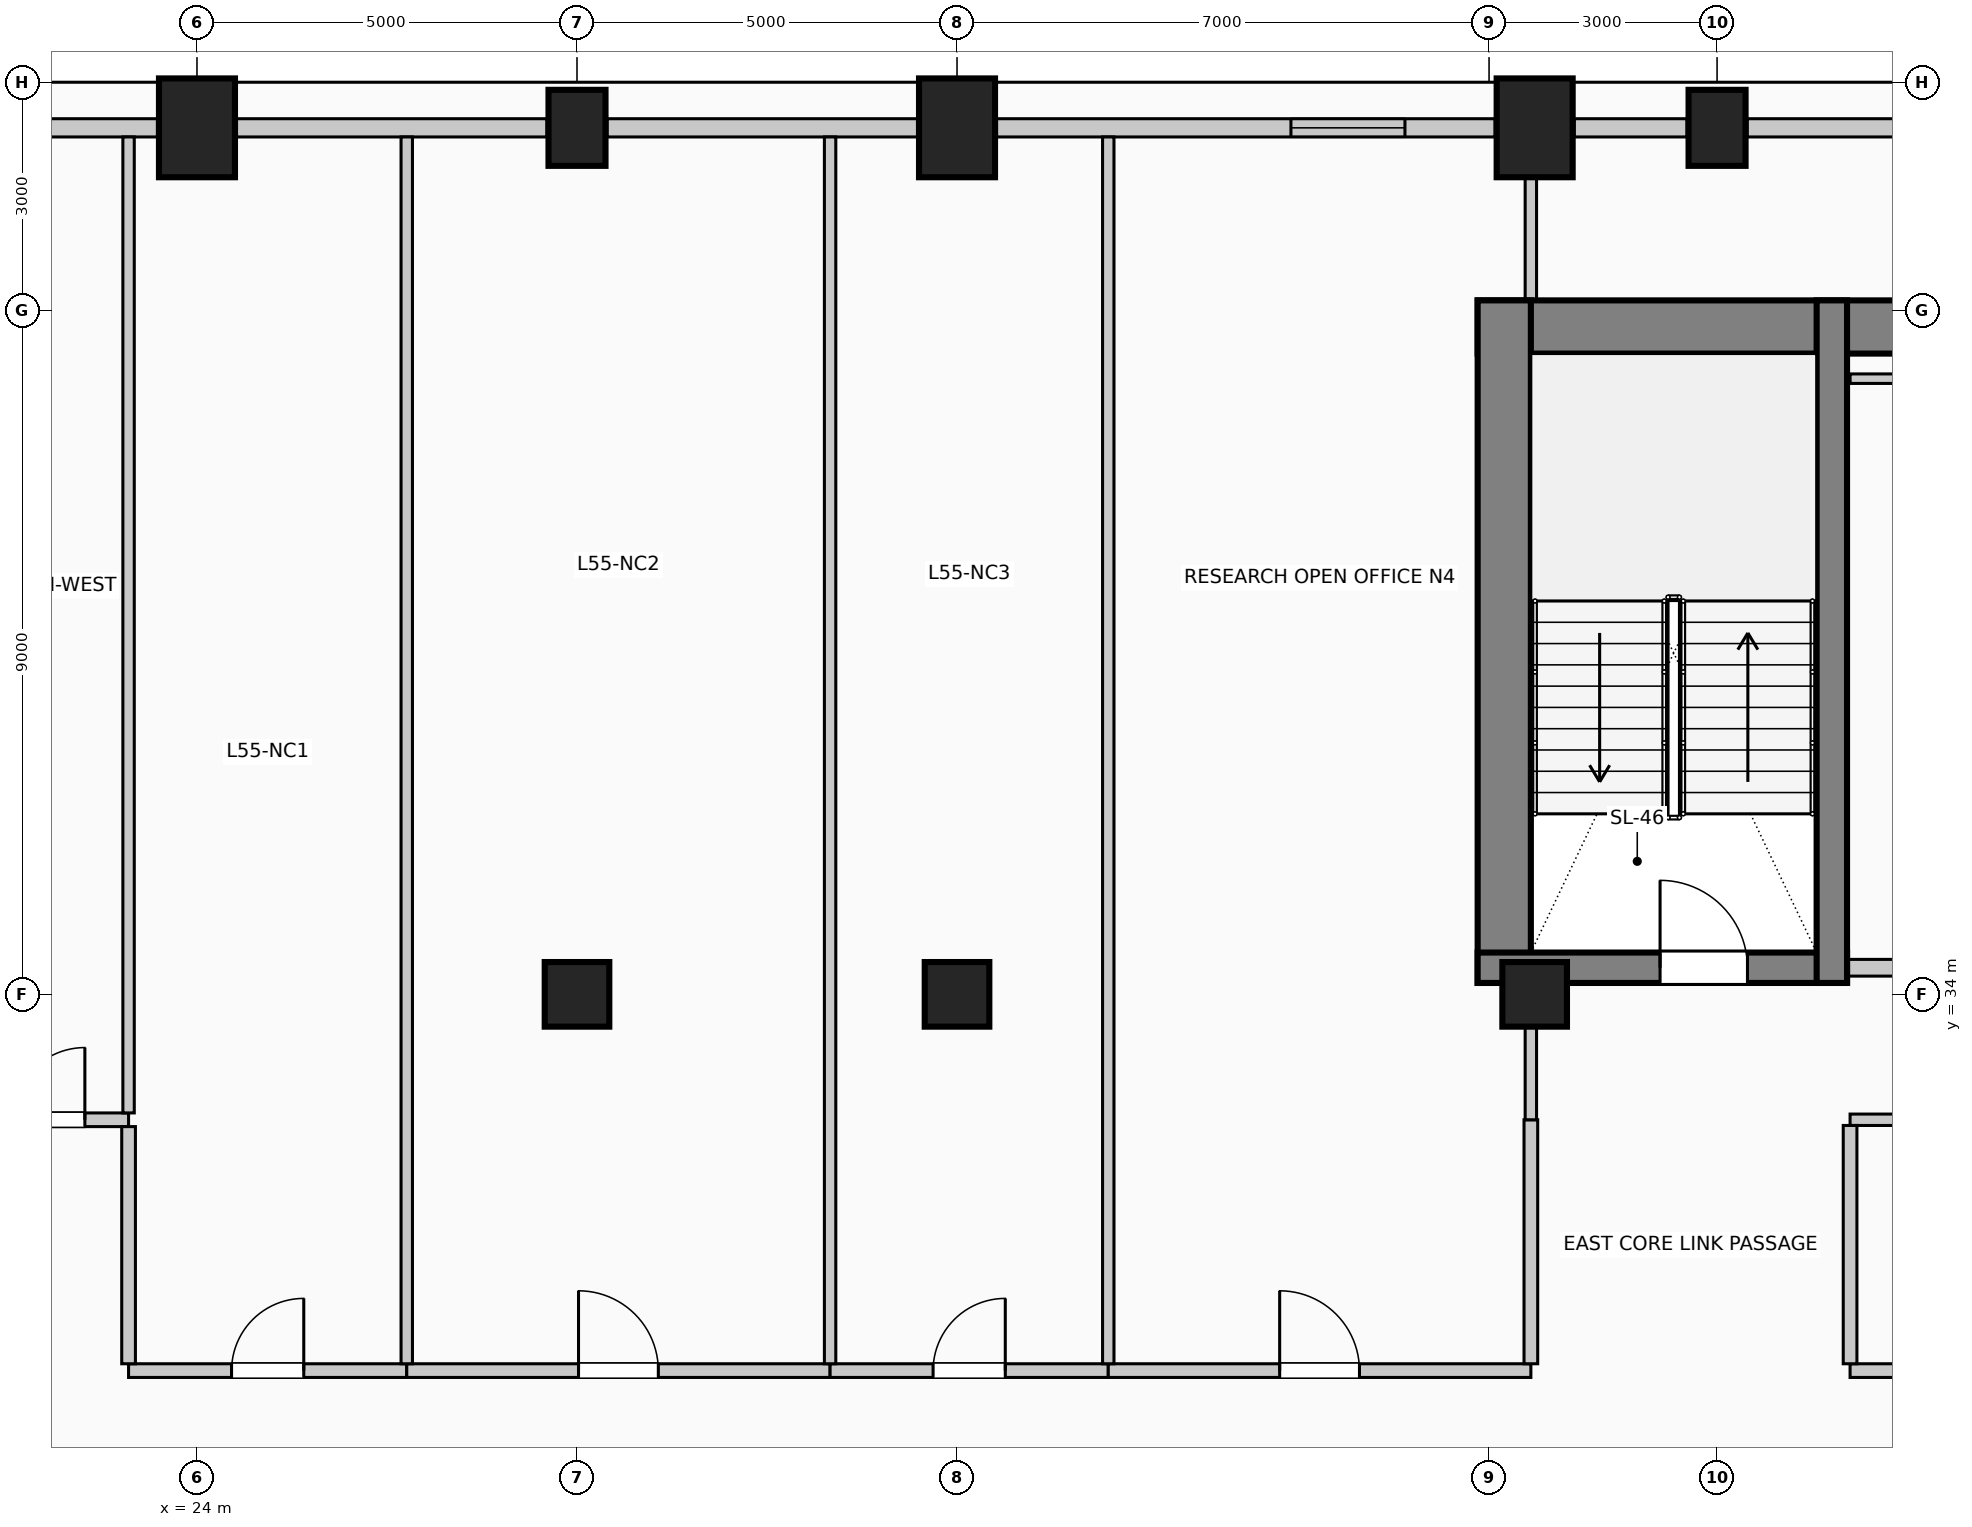
"""IFC4 building model, lengths in metres.
Left out: names, types, materials, properties, quantities, classifications, styles, units other than length and angle.
Written with IfcOpenShell. Run it as: python <this file> out.ifc"""

import sys

from ifc_helpers import new_model, si_unit, direction, frame, frame_2d, origin, origin_2d, place, context, subcontext, project, spatial, rectangle, circle, extrude, element, fill, save


model = new_model("IFC4")
c1 = context("Model", 3, precision=1e-05, world=origin(), true_north=direction((0.0, 1.0)))
c2 = subcontext(c1, "Body", "Model", "MODEL_VIEW")
j1 = project(units=[si_unit("LENGTHUNIT", "METRE"), si_unit("PLANEANGLEUNIT", "RADIAN")], contexts=[c1])
p1 = place(None, origin())
s1 = spatial("IfcSite", under=j1, at=p1, CompositionType="ELEMENT")
p2 = place(p1, origin())
s2 = spatial("IfcBuilding", under=s1, at=p2, CompositionType="ELEMENT")
p3 = place(p2, frame((0.0, 0.0, 226.6)))
s3 = spatial("IfcBuildingStorey", under=s2, at=p3, CompositionType="ELEMENT", Elevation=226.6)
p4 = place(p3, frame((40.85, 42.78, 0.0), z_axis=(0.0, 0.0, 1.0), x_axis=(1.0, 0.0, 0.0)))
e1 = element("IfcWall", 1, at=p4, inside=s3, PredefinedType="SHEAR", context=c2, shape_type="SweptSolid", body=[
    extrude(rectangle(XDim=14.3, YDim=0.7, at=frame_2d((7.15, 0.0))), origin(), (0.0, 0.0, 1.0), 4.0),
])
p5 = place(p3, frame((41.2, 34.15, 0.0), z_axis=(0.0, 0.0, 1.0), x_axis=(0.0, 1.0, 0.0)))
e2 = element("IfcWall", 2, at=p5, inside=s3, PredefinedType="SHEAR", context=c2, shape_type="SweptSolid", body=[
    extrude(rectangle(XDim=8.98, YDim=0.7, at=frame_2d((4.49, 0.0))), origin(), (0.0, 0.0, 1.0), 4.0),
])
p6 = place(p3, frame((40.85, 34.35, 0.0), z_axis=(0.0, 0.0, 1.0), x_axis=(1.0, 0.0, 0.0)))
e3 = element("IfcWall", 3, at=p6, inside=s3, PredefinedType="SHEAR", context=c2, shape_type="SweptSolid", body=[
    extrude(rectangle(XDim=4.86, YDim=0.4, at=frame_2d((2.43, 0.0))), origin(), (0.0, 0.0, 1.0), 4.0),
])
p7 = place(p6, frame((2.4, 0.0, 0.0)))
e4 = element("IfcOpeningElement", 4, at=p7, cuts=e3, PredefinedType="OPENING", context=c2, shape_type="SweptSolid", body=[
    extrude(rectangle(XDim=1.15, YDim=2.2, at=frame_2d((0.575, 1.1))), frame((0.0, 0.21, 0.0), z_axis=(0.0, -1.0, 0.0), x_axis=(1.0, 0.0, 0.0)), (0.0, 0.0, 1.0), 0.42),
])
p8 = place(p3, frame((45.51, 34.15, 0.0), z_axis=(0.0, 0.0, 1.0), x_axis=(0.0, 1.0, 0.0)))
e5 = element("IfcWall", 5, at=p8, inside=s3, PredefinedType="SHEAR", context=c2, shape_type="SweptSolid", body=[
    extrude(rectangle(XDim=8.98, YDim=0.4, at=frame_2d((4.49, 0.0))), origin(), (0.0, 0.0, 1.0), 4.0),
])
p9 = place(p3, frame((24.0, 45.4, 0.0), z_axis=(0.0, 0.0, 1.0), x_axis=(1.0, 0.0, 0.0)))
e6 = element("IfcColumn", 6, at=p9, inside=s3, PredefinedType="COLUMN", context=c2, shape_type="SweptSolid", body=[
    extrude(rectangle(XDim=1.0, YDim=1.3, at=origin_2d()), origin(), (0.0, 0.0, 1.0), 4.0),
])
p10 = place(p3, frame((29.0, 45.4, 0.0), z_axis=(0.0, 0.0, 1.0), x_axis=(1.0, 0.0, 0.0)))
e7 = element("IfcColumn", 7, at=p10, inside=s3, PredefinedType="COLUMN", context=c2, shape_type="SweptSolid", body=[
    extrude(rectangle(XDim=0.75, YDim=1.0, at=origin_2d()), origin(), (0.0, 0.0, 1.0), 4.0),
])
for number, where, z_axis, x_axis in (
    (8, (34.0, 45.4, 0.0), (0.0, 0.0, 1.0), (1.0, 0.0, 0.0)),
    (9, (41.6, 45.4, 0.0), (0.0, 0.0, 1.0), (1.0, 0.0, 0.0)),
):
    element("IfcColumn", number, at=place(p3, frame(where, z_axis=z_axis, x_axis=x_axis)), inside=s3, PredefinedType="COLUMN", context=c2, shape_type="SweptSolid", body=[
        extrude(rectangle(XDim=1.0, YDim=1.3, at=origin_2d()), origin(), (0.0, 0.0, 1.0), 4.0),
    ])
p11 = place(p3, frame((44.0, 45.4, 0.0), z_axis=(0.0, 0.0, 1.0), x_axis=(1.0, 0.0, 0.0)))
e10 = element("IfcColumn", 10, at=p11, inside=s3, PredefinedType="COLUMN", context=c2, shape_type="SweptSolid", body=[
    extrude(rectangle(XDim=0.75, YDim=1.0, at=origin_2d()), origin(), (0.0, 0.0, 1.0), 4.0),
])
for number, where, z_axis, x_axis in (
    (11, (29.0, 34.0, 0.0), (0.0, 0.0, 1.0), (1.0, 0.0, 0.0)),
    (12, (41.6, 34.0, 0.0), (0.0, 0.0, 1.0), (1.0, 0.0, 0.0)),
    (13, (34.0, 34.0, 0.0), (0.0, 0.0, 1.0), (1.0, 0.0, 0.0)),
):
    element("IfcColumn", number, at=place(p3, frame(where, z_axis=z_axis, x_axis=x_axis)), inside=s3, PredefinedType="COLUMN", context=c2, shape_type="SweptSolid", body=[
        extrude(circle(Radius=0.425, at=origin_2d()), origin(), (0.0, 0.0, 1.0), 4.0),
    ])
p12 = place(p3, frame((16.92, 45.4, 0.0), z_axis=(0.0, 0.0, 1.0), x_axis=(1.0, 0.0, 0.0)))
e14 = element("IfcWall", 14, at=p12, inside=s3, PredefinedType="SOLIDWALL", context=c2, shape_type="SweptSolid", body=[
    extrude(rectangle(XDim=6.56, YDim=0.24, at=frame_2d((3.28, 0.0))), origin(), (0.0, 0.0, 1.0), 3.0),
])
p13 = place(p12, frame((1.187, 0.0, 0.42)))
e15 = element("IfcOpeningElement", 15, at=p13, cuts=e14, PredefinedType="OPENING", context=c2, shape_type="SweptSolid", body=[
    extrude(rectangle(XDim=1.5, YDim=2.2, at=frame_2d((0.75, 1.1))), frame((0.0, 0.13, 0.0), z_axis=(0.0, -1.0, 0.0), x_axis=(1.0, 0.0, 0.0)), (0.0, 0.0, 1.0), 0.26),
])
for number, where, z_axis, x_axis in (
    (16, (24.52, 45.4, 0.0), (0.0, 0.0, 1.0), (1.0, 0.0, 0.0)),
    (17, (29.395, 45.4, 0.0), (0.0, 0.0, 1.0), (1.0, 0.0, 0.0)),
):
    element("IfcWall", number, at=place(p3, frame(where, z_axis=z_axis, x_axis=x_axis)), inside=s3, PredefinedType="SOLIDWALL", context=c2, shape_type="SweptSolid", body=[
        extrude(rectangle(XDim=4.085, YDim=0.24, at=frame_2d((2.042, 0.0))), origin(), (0.0, 0.0, 1.0), 3.0),
    ])
p14 = place(p3, frame((34.52, 45.4, 0.0), z_axis=(0.0, 0.0, 1.0), x_axis=(1.0, 0.0, 0.0)))
e18 = element("IfcWall", 18, at=p14, inside=s3, PredefinedType="SOLIDWALL", context=c2, shape_type="SweptSolid", body=[
    extrude(rectangle(XDim=6.56, YDim=0.24, at=frame_2d((3.28, 0.0))), origin(), (0.0, 0.0, 1.0), 3.0),
])
p15 = place(p14, frame((3.873, 0.0, 0.42)))
e19 = element("IfcOpeningElement", 19, at=p15, cuts=e18, PredefinedType="OPENING", context=c2, shape_type="SweptSolid", body=[
    extrude(rectangle(XDim=1.5, YDim=2.2, at=frame_2d((0.75, 1.1))), frame((0.0, 0.13, 0.0), z_axis=(0.0, -1.0, 0.0), x_axis=(1.0, 0.0, 0.0)), (0.0, 0.0, 1.0), 0.26),
])
p16 = place(p3, frame((42.12, 45.4, 0.0), z_axis=(0.0, 0.0, 1.0), x_axis=(1.0, 0.0, 0.0)))
e20 = element("IfcWall", 20, at=p16, inside=s3, PredefinedType="SOLIDWALL", context=c2, shape_type="SweptSolid", body=[
    extrude(rectangle(XDim=1.485, YDim=0.24, at=frame_2d((0.742, 0.0))), origin(), (0.0, 0.0, 1.0), 3.0),
])
p17 = place(p3, frame((44.395, 45.4, 0.0), z_axis=(0.0, 0.0, 1.0), x_axis=(1.0, 0.0, 0.0)))
e21 = element("IfcWall", 21, at=p17, inside=s3, PredefinedType="SOLIDWALL", context=c2, shape_type="SweptSolid", body=[
    extrude(rectangle(XDim=4.71, YDim=0.24, at=frame_2d((2.355, 0.0))), origin(), (0.0, 0.0, 1.0), 3.0),
])
p18 = place(p3, frame((45.72, 34.35, 0.0), z_axis=(0.0, 0.0, 1.0), x_axis=(1.0, 0.0, 0.0)))
e22 = element("IfcWall", 22, at=p18, inside=s3, PredefinedType="PARTITIONING", context=c2, shape_type="SweptSolid", body=[
    extrude(rectangle(XDim=4.56, YDim=0.22, at=frame_2d((2.28, 0.0))), origin(), (0.0, 0.0, 1.0), 3.75),
])
p19 = place(p18, frame((0.65, 0.0, 0.0)))
e23 = element("IfcOpeningElement", 23, at=p19, cuts=e22, PredefinedType="OPENING", context=c2, shape_type="SweptSolid", body=[
    extrude(rectangle(XDim=0.92, YDim=2.1, at=frame_2d((0.46, 1.05))), frame((0.0, 0.12, 0.0), z_axis=(0.0, -1.0, 0.0), x_axis=(1.0, 0.0, 0.0)), (0.0, 0.0, 1.0), 0.24),
])
p20 = place(p18, frame((2.95, 0.0, 0.0)))
e24 = element("IfcOpeningElement", 24, at=p20, cuts=e22, PredefinedType="OPENING", context=c2, shape_type="SweptSolid", body=[
    extrude(rectangle(XDim=0.88, YDim=2.1, at=frame_2d((0.44, 1.05))), frame((0.0, 0.12, 0.0), z_axis=(0.0, -1.0, 0.0), x_axis=(1.0, 0.0, 0.0)), (0.0, 0.0, 1.0), 0.24),
])
p21 = place(p3, frame((23.1, 29.05, 0.0), z_axis=(0.0, 0.0, 1.0), x_axis=(1.0, 0.0, 0.0)))
e25 = element("IfcWall", 25, at=p21, inside=s3, PredefinedType="PARTITIONING", context=c2, shape_type="SweptSolid", body=[
    extrude(rectangle(XDim=3.66, YDim=0.18, at=frame_2d((1.83, 0.0))), origin(), (0.0, 0.0, 1.0), 3.75),
])
p22 = place(p21, frame((1.355, 0.0, 0.0)))
e26 = element("IfcOpeningElement", 26, at=p22, cuts=e25, PredefinedType="OPENING", context=c2, shape_type="SweptSolid", body=[
    extrude(rectangle(XDim=0.95, YDim=2.15, at=frame_2d((0.475, 1.075))), frame((0.0, 0.1, 0.0), z_axis=(0.0, -1.0, 0.0), x_axis=(1.0, 0.0, 0.0)), (0.0, 0.0, 1.0), 0.2),
])
p23 = place(p3, frame((26.76, 29.05, 0.0), z_axis=(0.0, 0.0, 1.0), x_axis=(1.0, 0.0, 0.0)))
e27 = element("IfcWall", 27, at=p23, inside=s3, PredefinedType="PARTITIONING", context=c2, shape_type="SweptSolid", body=[
    extrude(rectangle(XDim=5.57, YDim=0.18, at=frame_2d((2.785, 0.0))), origin(), (0.0, 0.0, 1.0), 3.75),
])
p24 = place(p23, frame((2.26, 0.0, 0.0)))
e28 = element("IfcOpeningElement", 28, at=p24, cuts=e27, PredefinedType="OPENING", context=c2, shape_type="SweptSolid", body=[
    extrude(rectangle(XDim=1.05, YDim=2.15, at=frame_2d((0.525, 1.075))), frame((0.0, 0.1, 0.0), z_axis=(0.0, -1.0, 0.0), x_axis=(1.0, 0.0, 0.0)), (0.0, 0.0, 1.0), 0.2),
])
p25 = place(p3, frame((32.33, 29.05, 0.0), z_axis=(0.0, 0.0, 1.0), x_axis=(1.0, 0.0, 0.0)))
e29 = element("IfcWall", 29, at=p25, inside=s3, PredefinedType="PARTITIONING", context=c2, shape_type="SweptSolid", body=[
    extrude(rectangle(XDim=3.66, YDim=0.18, at=frame_2d((1.83, 0.0))), origin(), (0.0, 0.0, 1.0), 3.75),
])
p26 = place(p25, frame((1.355, 0.0, 0.0)))
e30 = element("IfcOpeningElement", 30, at=p26, cuts=e29, PredefinedType="OPENING", context=c2, shape_type="SweptSolid", body=[
    extrude(rectangle(XDim=0.95, YDim=2.15, at=frame_2d((0.475, 1.075))), frame((0.0, 0.1, 0.0), z_axis=(0.0, -1.0, 0.0), x_axis=(1.0, 0.0, 0.0)), (0.0, 0.0, 1.0), 0.2),
])
p27 = place(p3, frame((35.99, 29.05, 0.0), z_axis=(0.0, 0.0, 1.0), x_axis=(1.0, 0.0, 0.0)))
e31 = element("IfcWall", 31, at=p27, inside=s3, PredefinedType="PARTITIONING", context=c2, shape_type="SweptSolid", body=[
    extrude(rectangle(XDim=5.56, YDim=0.18, at=frame_2d((2.78, 0.0))), origin(), (0.0, 0.0, 1.0), 3.75),
])
p28 = place(p27, frame((2.255, 0.0, 0.0)))
e32 = element("IfcOpeningElement", 32, at=p28, cuts=e31, PredefinedType="OPENING", context=c2, shape_type="SweptSolid", body=[
    extrude(rectangle(XDim=1.05, YDim=2.15, at=frame_2d((0.525, 1.075))), frame((0.0, 0.1, 0.0), z_axis=(0.0, -1.0, 0.0), x_axis=(1.0, 0.0, 0.0)), (0.0, 0.0, 1.0), 0.2),
])
p29 = place(p3, frame((45.75, 29.05, 0.0), z_axis=(0.0, 0.0, 1.0), x_axis=(1.0, 0.0, 0.0)))
e33 = element("IfcWall", 33, at=p29, inside=s3, PredefinedType="PARTITIONING", context=c2, shape_type="SweptSolid", body=[
    extrude(rectangle(XDim=11.53, YDim=0.18, at=frame_2d((5.765, 0.0))), origin(), (0.0, 0.0, 1.0), 3.75),
])
p30 = place(p29, frame((5.29, 0.0, 0.0)))
e34 = element("IfcOpeningElement", 34, at=p30, cuts=e33, PredefinedType="OPENING", context=c2, shape_type="SweptSolid", body=[
    extrude(rectangle(XDim=0.95, YDim=2.15, at=frame_2d((0.475, 1.075))), frame((0.0, 0.1, 0.0), z_axis=(0.0, -1.0, 0.0), x_axis=(1.0, 0.0, 0.0)), (0.0, 0.0, 1.0), 0.2),
])
p31 = place(p3, frame((21.0, 32.35, 0.0), z_axis=(0.0, 0.0, 1.0), x_axis=(1.0, 0.0, 0.0)))
e35 = element("IfcWall", 35, at=p31, inside=s3, PredefinedType="PARTITIONING", context=c2, shape_type="SweptSolid", body=[
    extrude(rectangle(XDim=2.1, YDim=0.18, at=frame_2d((1.05, 0.0))), origin(), (0.0, 0.0, 1.0), 3.75),
])
p32 = place(p31, frame((0.575, 0.0, 0.0)))
e36 = element("IfcOpeningElement", 36, at=p32, cuts=e35, PredefinedType="OPENING", context=c2, shape_type="SweptSolid", body=[
    extrude(rectangle(XDim=0.95, YDim=2.15, at=frame_2d((0.475, 1.075))), frame((0.0, 0.1, 0.0), z_axis=(0.0, -1.0, 0.0), x_axis=(1.0, 0.0, 0.0)), (0.0, 0.0, 1.0), 0.2),
])
p33 = place(p3, frame((45.75, 32.35, 0.0), z_axis=(0.0, 0.0, 1.0), x_axis=(1.0, 0.0, 0.0)))
e37 = element("IfcWall", 37, at=p33, inside=s3, PredefinedType="PARTITIONING", context=c2, shape_type="SweptSolid", body=[
    extrude(rectangle(XDim=8.7, YDim=0.15, at=frame_2d((4.35, 0.0))), origin(), (0.0, 0.0, 1.0), 3.75),
])
p34 = place(p3, frame((45.75, 42.1, 0.0), z_axis=(0.0, 0.0, 1.0), x_axis=(1.0, 0.0, 0.0)))
e38 = element("IfcWall", 38, at=p34, inside=s3, PredefinedType="PARTITIONING", context=c2, shape_type="SweptSolid", body=[
    extrude(rectangle(XDim=2.25, YDim=0.125, at=frame_2d((1.125, 0.0))), origin(), (0.0, 0.0, 1.0), 3.75),
])
p35 = place(p3, frame((23.1, 29.14, 0.0), z_axis=(0.0, 0.0, 1.0), x_axis=(0.0, 1.0, 0.0)))
e39 = element("IfcWall", 39, at=p35, inside=s3, PredefinedType="PARTITIONING", context=c2, shape_type="SweptSolid", body=[
    extrude(rectangle(XDim=3.12, YDim=0.18, at=frame_2d((1.56, 0.0))), origin(), (0.0, 0.0, 1.0), 3.75),
])
p36 = place(p3, frame((23.1, 32.44, 0.0), z_axis=(0.0, 0.0, 1.0), x_axis=(0.0, 1.0, 0.0)))
e40 = element("IfcWall", 40, at=p36, inside=s3, PredefinedType="PARTITIONING", context=c2, shape_type="SweptSolid", body=[
    extrude(rectangle(XDim=12.84, YDim=0.15, at=frame_2d((6.42, 0.0))), origin(), (0.0, 0.0, 1.0), 3.75),
])
for number, where, z_axis, x_axis in (
    (41, (26.76, 29.14, 0.0), (0.0, 0.0, 1.0), (0.0, 1.0, 0.0)),
    (42, (32.33, 29.14, 0.0), (0.0, 0.0, 1.0), (0.0, 1.0, 0.0)),
    (43, (35.99, 29.14, 0.0), (0.0, 0.0, 1.0), (0.0, 1.0, 0.0)),
):
    element("IfcWall", number, at=place(p3, frame(where, z_axis=z_axis, x_axis=x_axis)), inside=s3, PredefinedType="PARTITIONING", context=c2, shape_type="SweptSolid", body=[
        extrude(rectangle(XDim=16.14, YDim=0.15, at=frame_2d((8.07, 0.0))), origin(), (0.0, 0.0, 1.0), 3.75),
    ])
p37 = place(p3, frame((41.55, 29.14, 0.0), z_axis=(0.0, 0.0, 1.0), x_axis=(0.0, 1.0, 0.0)))
e44 = element("IfcWall", 44, at=p37, inside=s3, PredefinedType="PARTITIONING", context=c2, shape_type="SweptSolid", body=[
    extrude(rectangle(XDim=3.21, YDim=0.18, at=frame_2d((1.605, 0.0))), origin(), (0.0, 0.0, 1.0), 3.145),
])
p38 = place(p3, frame((41.55, 32.35, 0.0), z_axis=(0.0, 0.0, 1.0), x_axis=(0.0, 1.0, 0.0)))
e45 = element("IfcWall", 45, at=p38, inside=s3, PredefinedType="PARTITIONING", context=c2, shape_type="SweptSolid", body=[
    extrude(rectangle(XDim=1.225, YDim=0.15, at=frame_2d((0.612, 0.0))), origin(), (0.0, 0.0, 1.0), 3.145),
])
p39 = place(p3, frame((41.55, 43.13, 0.0), z_axis=(0.0, 0.0, 1.0), x_axis=(0.0, 1.0, 0.0)))
e46 = element("IfcWall", 46, at=p39, inside=s3, PredefinedType="PARTITIONING", context=c2, shape_type="SweptSolid", body=[
    extrude(rectangle(XDim=1.62, YDim=0.15, at=frame_2d((0.81, 0.0))), origin(), (0.0, 0.0, 1.0), 3.75),
])
p40 = place(p3, frame((45.75, 29.14, 0.0), z_axis=(0.0, 0.0, 1.0), x_axis=(0.0, 1.0, 0.0)))
e47 = element("IfcWall", 47, at=p40, inside=s3, PredefinedType="PARTITIONING", context=c2, shape_type="SweptSolid", body=[
    extrude(rectangle(XDim=3.135, YDim=0.18, at=frame_2d((1.567, 0.0))), origin(), (0.0, 0.0, 1.0), 3.75),
])
p41 = place(p15, origin())
e48 = element("IfcWindow", 48, at=p41, inside=s3, PartitioningType="SINGLE_PANEL", PredefinedType="WINDOW", context=c2, shape_type="SweptSolid", body=[
    extrude(rectangle(XDim=1.5, YDim=2.2, at=frame_2d((0.75, 1.1))), frame((0.0, 0.03, 0.0), z_axis=(0.0, -1.0, 0.0), x_axis=(1.0, 0.0, 0.0)), (0.0, 0.0, 1.0), 0.06),
])
fill(e19, e48)
p42 = place(p7, origin())
e49 = element("IfcDoor", 49, at=p42, inside=s3, OperationType="SINGLE_SWING_LEFT", PredefinedType="DOOR", context=c2, shape_type="SweptSolid", body=[
    extrude(rectangle(XDim=1.15, YDim=2.2, at=frame_2d((0.575, 1.1))), frame((0.0, 0.025, 0.0), z_axis=(0.0, -1.0, 0.0), x_axis=(1.0, 0.0, 0.0)), (0.0, 0.0, 1.0), 0.05),
])
fill(e4, e49)
p43 = place(p22, origin())
e50 = element("IfcDoor", 50, at=p43, inside=s3, OperationType="SINGLE_SWING_RIGHT", PredefinedType="DOOR", context=c2, shape_type="SweptSolid", body=[
    extrude(rectangle(XDim=0.95, YDim=2.15, at=frame_2d((0.475, 1.075))), frame((0.0, 0.025, 0.0), z_axis=(0.0, -1.0, 0.0), x_axis=(1.0, 0.0, 0.0)), (0.0, 0.0, 1.0), 0.05),
])
fill(e26, e50)
p44 = place(p24, origin())
e51 = element("IfcDoor", 51, at=p44, inside=s3, OperationType="SINGLE_SWING_LEFT", PredefinedType="DOOR", context=c2, shape_type="SweptSolid", body=[
    extrude(rectangle(XDim=1.05, YDim=2.15, at=frame_2d((0.525, 1.075))), frame((0.0, 0.025, 0.0), z_axis=(0.0, -1.0, 0.0), x_axis=(1.0, 0.0, 0.0)), (0.0, 0.0, 1.0), 0.05),
])
fill(e28, e51)
p45 = place(p26, origin())
e52 = element("IfcDoor", 52, at=p45, inside=s3, OperationType="SINGLE_SWING_RIGHT", PredefinedType="DOOR", context=c2, shape_type="SweptSolid", body=[
    extrude(rectangle(XDim=0.95, YDim=2.15, at=frame_2d((0.475, 1.075))), frame((0.0, 0.025, 0.0), z_axis=(0.0, -1.0, 0.0), x_axis=(1.0, 0.0, 0.0)), (0.0, 0.0, 1.0), 0.05),
])
fill(e30, e52)
p46 = place(p28, origin())
e53 = element("IfcDoor", 53, at=p46, inside=s3, OperationType="SINGLE_SWING_LEFT", PredefinedType="DOOR", context=c2, shape_type="SweptSolid", body=[
    extrude(rectangle(XDim=1.05, YDim=2.15, at=frame_2d((0.525, 1.075))), frame((0.0, 0.025, 0.0), z_axis=(0.0, -1.0, 0.0), x_axis=(1.0, 0.0, 0.0)), (0.0, 0.0, 1.0), 0.05),
])
fill(e32, e53)
p47 = place(p32, origin())
e54 = element("IfcDoor", 54, at=p47, inside=s3, OperationType="SINGLE_SWING_RIGHT", PredefinedType="DOOR", context=c2, shape_type="SweptSolid", body=[
    extrude(rectangle(XDim=0.95, YDim=2.15, at=frame_2d((0.475, 1.075))), frame((0.0, 0.025, 0.0), z_axis=(0.0, -1.0, 0.0), x_axis=(1.0, 0.0, 0.0)), (0.0, 0.0, 1.0), 0.05),
])
fill(e36, e54)
save(model, sys.argv[1])
